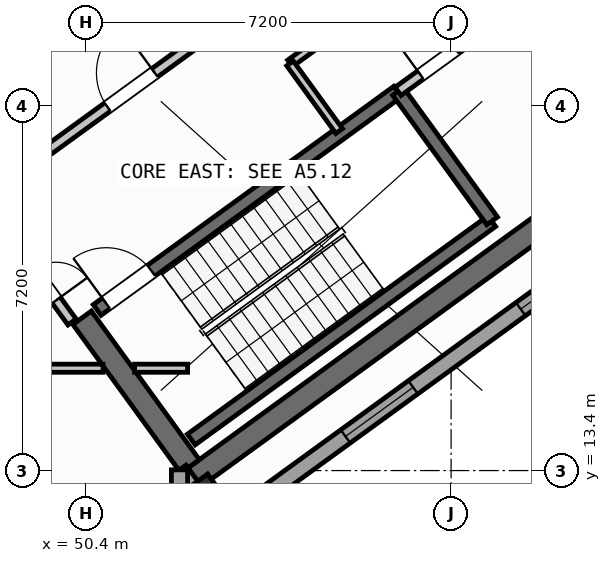
"""IFC4 building model, lengths in metres.
Left out: names, types, materials, properties, quantities, classifications, styles, units other than length and angle.
Written with IfcOpenShell. Run it as: python <this file> out.ifc"""

import sys

from ifc_helpers import new_model, si_unit, direction, frame, frame_2d, origin, origin_2d, place, context, subcontext, project, spatial, rectangle, hollow_rectangle, extrude, source, transform, mapped, element, fill, save


model = new_model("IFC4")
c1 = context("Model", 3, precision=1e-05, world=origin(), true_north=direction((0.0, 1.0)))
c2 = subcontext(c1, "Body", "Model", "MODEL_VIEW")
j1 = project(units=[si_unit("LENGTHUNIT", "METRE"), si_unit("PLANEANGLEUNIT", "RADIAN")], contexts=[c1])
p1 = place(None, origin())
s1 = spatial("IfcSite", under=j1, at=p1, CompositionType="ELEMENT")
p2 = place(p1, origin())
s2 = spatial("IfcBuilding", under=s1, at=p2, CompositionType="ELEMENT")
p3 = place(p2, frame((0.0, 0.0, 229.2)))
s3 = spatial("IfcBuildingStorey", under=s2, at=p3, CompositionType="ELEMENT", Elevation=229.2)
p4 = place(p3, frame((52.399, 13.169, 0.0), z_axis=(0.0, 0.0, 1.0), x_axis=(0.809022352778, 0.587777877013, 0.0)))
e1 = element("IfcWall", 1, at=p4, inside=s3, PredefinedType="SHEAR", context=c2, shape_type="SweptSolid", body=[
    extrude(rectangle(XDim=12.24, YDim=0.45, at=frame_2d((6.12, 0.0))), origin(), (0.0, 0.0, 1.0), 4.22),
])
p5 = place(p3, frame((52.449, 13.483, 0.0), z_axis=(0.0, 0.0, 1.0), x_axis=(-0.587819244441, 0.808992296542, 0.0)))
e2 = element("IfcWall", 2, at=p5, inside=s3, PredefinedType="SHEAR", context=c2, shape_type="SweptSolid", body=[
    extrude(rectangle(XDim=3.625, YDim=0.45, at=frame_2d((1.812, 0.0))), origin(), (0.0, 0.0, 1.0), 4.22),
])
m1 = source(origin(), c2, "Body", "SweptSolid", [
    extrude(hollow_rectangle(XDim=0.8, YDim=0.8, WallThickness=0.032, at=origin_2d()), origin(), (0.0, 0.0, 1.0), 4.5),
])
p6 = place(p3, frame((52.705, 12.773, 0.0), z_axis=(0.0, 0.0, 1.0), x_axis=(0.809016994375, 0.587785252292, 0.0)))
e3 = element("IfcColumn", 3, at=p6, inside=s3, PredefinedType="COLUMN", context=c2, shape_type="MappedRepresentation", body=[
    mapped(m1, transform((0.0, 0.0, 0.0), scale=1.0)),
])
p7 = place(p3, frame((67.454, 22.747, 0.0), z_axis=(0.0, 0.0, 1.0), x_axis=(-0.809021120468, -0.587779573171, 0.0)))
e4 = element("IfcWall", 4, at=p7, inside=s3, PredefinedType="STANDARD", context=c2, shape_type="SweptSolid", body=[
    extrude(rectangle(XDim=17.588, YDim=0.32, at=frame_2d((8.794, 0.0))), origin(), (0.0, 0.0, 1.0), 4.22),
])
p8 = place(p7, frame((1.611, 0.0, 0.0)))
e5 = element("IfcOpeningElement", 5, at=p8, cuts=e4, PredefinedType="OPENING", context=c2, shape_type="SweptSolid", body=[
    extrude(rectangle(XDim=1.05, YDim=2.15, at=frame_2d((0.525, 1.075))), frame((0.0, 0.17, 0.0), z_axis=(0.0, -1.0, 0.0), x_axis=(1.0, 0.0, 0.0)), (0.0, 0.0, 1.0), 0.34),
])
p9 = place(p7, frame((8.831, 0.0, 0.9)))
e6 = element("IfcOpeningElement", 6, at=p9, cuts=e4, PredefinedType="OPENING", context=c2, shape_type="SweptSolid", body=[
    extrude(rectangle(XDim=1.65, YDim=1.45, at=frame_2d((0.825, 0.725))), frame((0.0, 0.17, 0.0), z_axis=(0.0, -1.0, 0.0), x_axis=(1.0, 0.0, 0.0)), (0.0, 0.0, 1.0), 0.34),
])
p10 = place(p7, frame((13.106, 0.0, 0.9)))
e7 = element("IfcOpeningElement", 7, at=p10, cuts=e4, PredefinedType="OPENING", context=c2, shape_type="SweptSolid", body=[
    extrude(rectangle(XDim=1.65, YDim=1.45, at=frame_2d((0.825, 0.725))), frame((0.0, 0.17, 0.0), z_axis=(0.0, -1.0, 0.0), x_axis=(1.0, 0.0, 0.0)), (0.0, 0.0, 1.0), 0.34),
])
p11 = place(p3, frame((52.937, 12.455, 0.0), z_axis=(0.0, 0.0, 1.0), x_axis=(-0.587706324018, 0.809074333241, 0.0)))
e8 = element("IfcWall", 8, at=p11, inside=s3, PredefinedType="STANDARD", context=c2, shape_type="SweptSolid", body=[
    extrude(rectangle(XDim=1.186, YDim=0.32, at=frame_2d((0.593, 0.0))), origin(), (0.0, 0.0, 1.0), 2.395),
])
p12 = place(p3, frame((52.24, 13.414, 0.0), z_axis=(0.0, 0.0, 1.0), x_axis=(0.0, -1.0, 0.0)))
e9 = element("IfcWall", 9, at=p12, inside=s3, PredefinedType="STANDARD", context=c2, shape_type="SweptSolid", body=[
    extrude(rectangle(XDim=9.948, YDim=0.32, at=frame_2d((4.974, 0.0))), origin(), (0.0, 0.0, 1.0), 4.22),
])
p13 = place(p12, frame((3.322, 0.0, 0.9)))
e10 = element("IfcOpeningElement", 10, at=p13, cuts=e9, PredefinedType="OPENING", context=c2, shape_type="SweptSolid", body=[
    extrude(rectangle(XDim=1.65, YDim=1.45, at=frame_2d((0.825, 0.725))), frame((0.0, 0.17, 0.0), z_axis=(0.0, -1.0, 0.0), x_axis=(1.0, 0.0, 0.0)), (0.0, 0.0, 1.0), 0.34),
])
p14 = place(p12, frame((7.258, 0.0, 0.9)))
e11 = element("IfcOpeningElement", 11, at=p14, cuts=e9, PredefinedType="OPENING", context=c2, shape_type="SweptSolid", body=[
    extrude(rectangle(XDim=1.35, YDim=1.45, at=frame_2d((0.675, 0.725))), frame((0.0, 0.17, 0.0), z_axis=(0.0, -1.0, 0.0), x_axis=(1.0, 0.0, 0.0)), (0.0, 0.0, 1.0), 0.34),
])
p15 = place(p3, frame((52.472, 14.013, 0.0), z_axis=(0.0, 0.0, 1.0), x_axis=(0.809028366311, 0.587769599847, 0.0)))
e12 = element("IfcWall", 12, at=p15, inside=s3, PredefinedType="SHEAR", context=c2, shape_type="SweptSolid", body=[
    extrude(rectangle(XDim=7.33, YDim=0.26, at=frame_2d((3.665, 0.0))), origin(), (0.0, 0.0, 1.0), 4.22),
])
p16 = place(p3, frame((50.615, 16.57, 0.0), z_axis=(0.0, 0.0, 1.0), x_axis=(0.809028366311, 0.587769599847, 0.0)))
e13 = element("IfcWall", 13, at=p16, inside=s3, PredefinedType="SHEAR", context=c2, shape_type="SweptSolid", body=[
    extrude(rectangle(XDim=7.33, YDim=0.26, at=frame_2d((3.665, 0.0))), origin(), (0.0, 0.0, 1.0), 4.22),
])
p17 = place(p16, frame((0.22, 0.0, 0.0)))
e14 = element("IfcOpeningElement", 14, at=p17, cuts=e13, PredefinedType="OPENING", context=c2, shape_type="SweptSolid", body=[
    extrude(rectangle(XDim=1.1, YDim=2.1, at=frame_2d((0.55, 1.05))), frame((0.0, 0.14, 0.0), z_axis=(0.0, -1.0, 0.0), x_axis=(1.0, 0.0, 0.0)), (0.0, 0.0, 1.0), 0.28),
])
p18 = place(p3, frame((58.41, 18.327, 0.0), z_axis=(0.0, 0.0, 1.0), x_axis=(-0.58776738483, 0.809029975545, 0.0)))
e15 = element("IfcWall", 15, at=p18, inside=s3, PredefinedType="SHEAR", context=c2, shape_type="SweptSolid", body=[
    extrude(rectangle(XDim=3.16, YDim=0.26, at=frame_2d((1.58, 0.0))), origin(), (0.0, 0.0, 1.0), 4.22),
])
p19 = place(p3, frame((47.025, 21.378, 0.0), z_axis=(0.0, 0.0, 1.0), x_axis=(0.809052869724, 0.587735870941, 0.0)))
e16 = element("IfcWall", 16, at=p19, inside=s3, PredefinedType="STANDARD", context=c2, shape_type="SweptSolid", body=[
    extrude(rectangle(XDim=3.498, YDim=0.2, at=frame_2d((1.749, 0.0))), origin(), (0.0, 0.0, 1.0), 4.21),
])
p20 = place(p19, frame((0.508, 0.0, 0.0)))
e17 = element("IfcOpeningElement", 17, at=p20, cuts=e16, PredefinedType="OPENING", context=c2, shape_type="SweptSolid", body=[
    extrude(rectangle(XDim=1.3, YDim=2.2, at=frame_2d((0.65, 1.1))), frame((0.0, 0.11, 0.0), z_axis=(0.0, -1.0, 0.0), x_axis=(1.0, 0.0, 0.0)), (0.0, 0.0, 1.0), 0.22),
])
p21 = place(p3, frame((48.718, 19.048, 0.0), z_axis=(0.0, 0.0, 1.0), x_axis=(0.809017261719, 0.587784884325, 0.0)))
e18 = element("IfcWall", 18, at=p21, inside=s3, PredefinedType="STANDARD", context=c2, shape_type="SweptSolid", body=[
    extrude(rectangle(XDim=5.818, YDim=0.2, at=frame_2d((2.909, 0.0))), origin(), (0.0, 0.0, 1.0), 4.21),
])
p22 = place(p21, frame((2.598, 0.0, 0.0)))
e19 = element("IfcOpeningElement", 19, at=p22, cuts=e18, PredefinedType="OPENING", context=c2, shape_type="SweptSolid", body=[
    extrude(rectangle(XDim=1.15, YDim=2.1, at=frame_2d((0.575, 1.05))), frame((0.0, 0.11, 0.0), z_axis=(0.0, -1.0, 0.0), x_axis=(1.0, 0.0, 0.0)), (0.0, 0.0, 1.0), 0.22),
])
p23 = place(p3, frame((56.553, 20.884, 0.0), z_axis=(0.0, 0.0, 1.0), x_axis=(0.809041669066, 0.587751288995, 0.0)))
e20 = element("IfcWall", 20, at=p23, inside=s3, PredefinedType="STANDARD", context=c2, shape_type="SweptSolid", body=[
    extrude(rectangle(XDim=3.868, YDim=0.2, at=frame_2d((1.934, 0.0))), origin(), (0.0, 0.0, 1.0), 4.21),
])
p24 = place(p23, frame((0.55, 0.0, 0.0)))
e21 = element("IfcOpeningElement", 21, at=p24, cuts=e20, PredefinedType="OPENING", context=c2, shape_type="SweptSolid", body=[
    extrude(rectangle(XDim=0.86, YDim=2.05, at=frame_2d((0.43, 1.025))), frame((0.0, 0.11, 0.0), z_axis=(0.0, -1.0, 0.0), x_axis=(1.0, 0.0, 0.0)), (0.0, 0.0, 1.0), 0.22),
])
p25 = place(p3, frame((54.421, 21.436, 0.0), z_axis=(0.0, 0.0, 1.0), x_axis=(0.809013710463, 0.587789772183, 0.0)))
e22 = element("IfcWall", 22, at=p25, inside=s3, PredefinedType="PARTITIONING", context=c2, shape_type="SweptSolid", body=[
    extrude(rectangle(XDim=5.36, YDim=0.16, at=frame_2d((2.68, 0.0))), origin(), (0.0, 0.0, 1.0), 4.21),
])
p26 = place(p25, frame((1.4, 0.0, 0.0)))
e23 = element("IfcOpeningElement", 23, at=p26, cuts=e22, PredefinedType="OPENING", context=c2, shape_type="SweptSolid", body=[
    extrude(rectangle(XDim=0.86, YDim=2.05, at=frame_2d((0.43, 1.025))), frame((0.0, 0.09, 0.0), z_axis=(0.0, -1.0, 0.0), x_axis=(1.0, 0.0, 0.0)), (0.0, 0.0, 1.0), 0.18),
])
p27 = place(p3, frame((55.391, 20.102, 0.0), z_axis=(0.0, 0.0, 1.0), x_axis=(-0.58778447739, 0.809017557374, 0.0)))
e24 = element("IfcWall", 24, at=p27, inside=s3, PredefinedType="PARTITIONING", context=c2, shape_type="SweptSolid", body=[
    extrude(rectangle(XDim=1.65, YDim=0.16, at=frame_2d((0.825, 0.0))), origin(), (0.0, 0.0, 1.0), 4.21),
])
p28 = place(p3, frame((35.178, 15.42, 0.0), z_axis=(0.0, 0.0, 1.0), x_axis=(1.0, 0.0, 0.0)))
e25 = element("IfcWall", 25, at=p28, inside=s3, PredefinedType="PARTITIONING", context=c2, shape_type="SweptSolid", body=[
    extrude(rectangle(XDim=15.552, YDim=0.16, at=frame_2d((7.776, 0.0))), origin(), (0.0, 0.0, 1.0), 4.21),
])
p29 = place(p28, frame((1.028, 0.0, 0.0)))
e26 = element("IfcOpeningElement", 26, at=p29, cuts=e25, PredefinedType="OPENING", context=c2, shape_type="SweptSolid", body=[
    extrude(rectangle(XDim=1.0, YDim=2.1, at=frame_2d((0.5, 1.05))), frame((0.0, 0.09, 0.0), z_axis=(0.0, -1.0, 0.0), x_axis=(1.0, 0.0, 0.0)), (0.0, 0.0, 1.0), 0.18),
])
p30 = place(p28, frame((8.858, 0.0, 0.0)))
e27 = element("IfcOpeningElement", 27, at=p30, cuts=e25, PredefinedType="OPENING", context=c2, shape_type="SweptSolid", body=[
    extrude(rectangle(XDim=1.0, YDim=2.1, at=frame_2d((0.5, 1.05))), frame((0.0, 0.09, 0.0), z_axis=(0.0, -1.0, 0.0), x_axis=(1.0, 0.0, 0.0)), (0.0, 0.0, 1.0), 0.18),
])
p31 = place(p3, frame((51.354, 15.42, 0.0), z_axis=(0.0, 0.0, 1.0), x_axis=(1.0, 0.0, 0.0)))
e28 = element("IfcWall", 28, at=p31, inside=s3, PredefinedType="PARTITIONING", context=c2, shape_type="SweptSolid", body=[
    extrude(rectangle(XDim=1.046, YDim=0.16, at=frame_2d((0.523, 0.0))), origin(), (0.0, 0.0, 1.0), 4.21),
])
p32 = place(p3, frame((50.119, 16.333, 0.0), z_axis=(0.0, 0.0, 1.0), x_axis=(-0.587749856981, 0.809042709391, 0.0)))
e29 = element("IfcWall", 29, at=p32, inside=s3, PredefinedType="STANDARD", context=c2, shape_type="SweptSolid", body=[
    extrude(rectangle(XDim=2.96, YDim=0.2, at=frame_2d((1.48, 0.0))), origin(), (0.0, 0.0, 1.0), 2.395),
])
p33 = place(p32, frame((0.53, 0.0, 0.0)))
e30 = element("IfcOpeningElement", 30, at=p33, cuts=e29, PredefinedType="OPENING", context=c2, shape_type="SweptSolid", body=[
    extrude(rectangle(XDim=1.5, YDim=2.15, at=frame_2d((0.75, 1.075))), frame((0.0, 0.11, 0.0), z_axis=(0.0, -1.0, 0.0), x_axis=(1.0, 0.0, 0.0)), (0.0, 0.0, 1.0), 0.22),
])
m2 = source(origin(), c2, "Body", "SweptSolid", [
    extrude(rectangle(XDim=1.65, YDim=1.45, at=frame_2d((0.825, 0.725))), frame((0.0, 0.03, 0.0), z_axis=(0.0, -1.0, 0.0), x_axis=(1.0, 0.0, 0.0)), (0.0, 0.0, 1.0), 0.06),
])
p34 = place(p9, origin())
e31 = element("IfcWindow", 31, at=p34, inside=s3, PartitioningType="SINGLE_PANEL", PredefinedType="WINDOW", context=c2, shape_type="MappedRepresentation", body=[
    mapped(m2, transform((0.0, 0.0, 0.0), scale=1.0)),
])
fill(e6, e31)
p35 = place(p10, origin())
e32 = element("IfcWindow", 32, at=p35, inside=s3, PartitioningType="SINGLE_PANEL", PredefinedType="WINDOW", context=c2, shape_type="MappedRepresentation", body=[
    mapped(m2, transform((0.0, 0.0, 0.0), scale=1.0)),
])
fill(e7, e32)
m3 = source(origin(), c2, "Body", "SweptSolid", [
    extrude(rectangle(XDim=1.1, YDim=2.1, at=frame_2d((0.55, 1.05))), frame((0.0, 0.025, 0.0), z_axis=(0.0, -1.0, 0.0), x_axis=(1.0, 0.0, 0.0)), (0.0, 0.0, 1.0), 0.05),
])
p36 = place(p17, origin())
e33 = element("IfcDoor", 33, at=p36, inside=s3, OperationType="SINGLE_SWING_LEFT", PredefinedType="DOOR", context=c2, shape_type="MappedRepresentation", body=[
    mapped(m3, transform((0.0, 0.0, 0.0), scale=1.0)),
])
fill(e14, e33)
m4 = source(origin(), c2, "Body", "SweptSolid", [
    extrude(rectangle(XDim=1.15, YDim=2.1, at=frame_2d((0.575, 1.05))), frame((0.0, 0.025, 0.0), z_axis=(0.0, -1.0, 0.0), x_axis=(1.0, 0.0, 0.0)), (0.0, 0.0, 1.0), 0.05),
])
p37 = place(p22, origin())
e34 = element("IfcDoor", 34, at=p37, inside=s3, OperationType="SINGLE_SWING_RIGHT", PredefinedType="DOOR", context=c2, shape_type="MappedRepresentation", body=[
    mapped(m4, transform((0.0, 0.0, 0.0), scale=1.0)),
])
fill(e19, e34)
m5 = source(origin(), c2, "Body", "SweptSolid", [
    extrude(rectangle(XDim=0.86, YDim=2.05, at=frame_2d((0.43, 1.025))), frame((0.0, 0.025, 0.0), z_axis=(0.0, -1.0, 0.0), x_axis=(1.0, 0.0, 0.0)), (0.0, 0.0, 1.0), 0.05),
])
p38 = place(p24, origin())
e35 = element("IfcDoor", 35, at=p38, inside=s3, OperationType="SINGLE_SWING_LEFT", PredefinedType="DOOR", context=c2, shape_type="MappedRepresentation", body=[
    mapped(m5, transform((0.0, 0.0, 0.0), scale=1.0)),
])
fill(e21, e35)
m6 = source(origin(), c2, "Body", "SweptSolid", [
    extrude(rectangle(XDim=1.5, YDim=2.15, at=frame_2d((0.75, 1.075))), frame((0.0, 0.025, 0.0), z_axis=(0.0, -1.0, 0.0), x_axis=(1.0, 0.0, 0.0)), (0.0, 0.0, 1.0), 0.05),
])
p39 = place(p33, frame((1.5, 0.0, 0.0), z_axis=(0.0, 0.0, 1.0), x_axis=(-1.0, 0.0, 0.0)))
e36 = element("IfcDoor", 36, at=p39, inside=s3, OperationType="DOUBLE_DOOR_SINGLE_SWING", PredefinedType="DOOR", context=c2, shape_type="MappedRepresentation", body=[
    mapped(m6, transform((0.0, 0.0, 0.0), scale=1.0)),
])
fill(e30, e36)
save(model, sys.argv[1])
